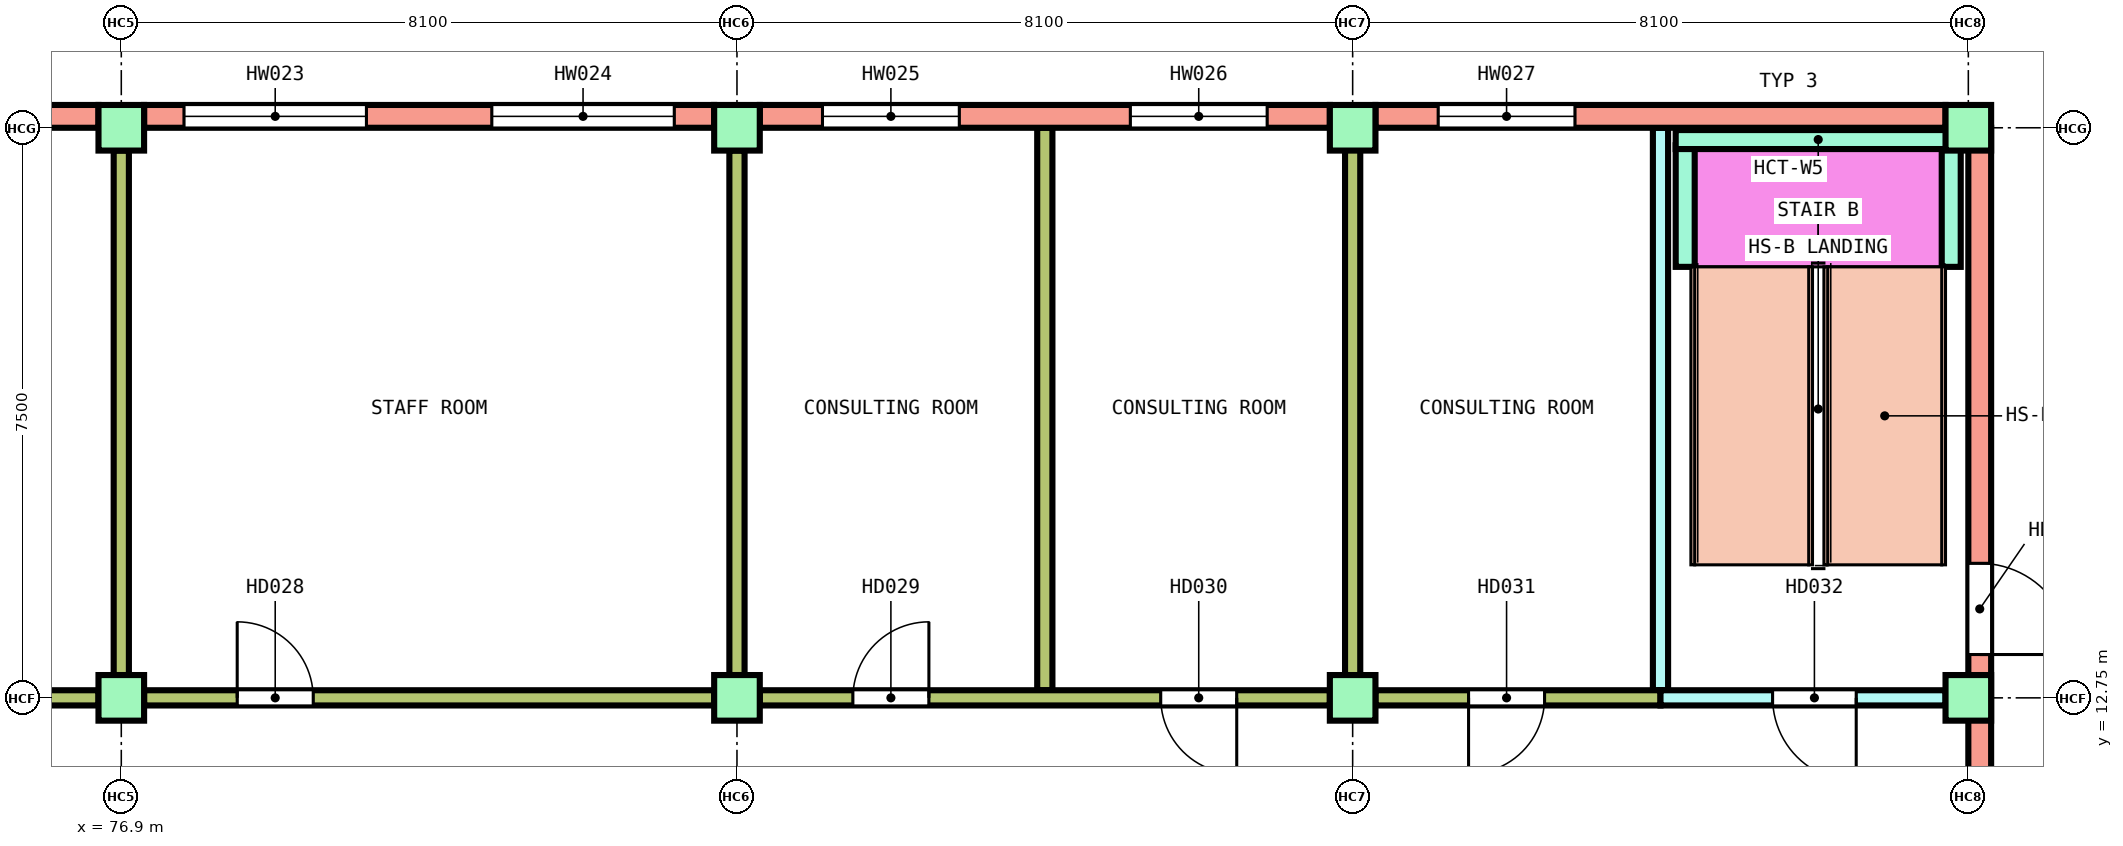
"""IFC4 building model, lengths in metres.
Left out: names, types, materials, properties, quantities, classifications, styles, units other than length and angle.
Written with IfcOpenShell. Run it as: python <this file> out.ifc"""

import sys

from ifc_helpers import new_model, si_unit, direction, frame, frame_2d, origin, origin_2d, place, context, subcontext, project, spatial, rectangle, extrude, element, fill, save


model = new_model("IFC4")
c1 = context("Model", 3, precision=1e-05, world=origin(), true_north=direction((0.0, 1.0)))
c2 = subcontext(c1, "Body", "Model", "MODEL_VIEW")
j1 = project(units=[si_unit("LENGTHUNIT", "METRE"), si_unit("PLANEANGLEUNIT", "RADIAN")], contexts=[c1])
p1 = place(None, origin())
s1 = spatial("IfcSite", under=j1, at=p1, CompositionType="ELEMENT")
p2 = place(p1, origin())
s2 = spatial("IfcBuilding", under=s1, at=p2, CompositionType="ELEMENT")
p3 = place(p2, origin())
s3 = spatial("IfcBuildingStorey", under=s2, at=p3, CompositionType="ELEMENT", Elevation=0.0)
for number, where, z_axis, x_axis in (
    (1, (76.9, 12.75, -0.25), (0.0, 0.0, 1.0), (1.0, 0.0, 0.0)),
    (2, (85.0, 12.75, -0.25), (0.0, 0.0, 1.0), (1.0, 0.0, 0.0)),
    (3, (93.1, 12.75, -0.25), (0.0, 0.0, 1.0), (1.0, 0.0, 0.0)),
    (4, (101.2, 12.75, -0.25), (0.0, 0.0, 1.0), (1.0, 0.0, 0.0)),
    (5, (76.9, 20.25, -0.25), (0.0, 0.0, 1.0), (1.0, 0.0, 0.0)),
    (6, (85.0, 20.25, -0.25), (0.0, 0.0, 1.0), (1.0, 0.0, 0.0)),
    (7, (93.1, 20.25, -0.25), (0.0, 0.0, 1.0), (1.0, 0.0, 0.0)),
    (8, (101.2, 20.25, -0.25), (0.0, 0.0, 1.0), (1.0, 0.0, 0.0)),
):
    element("IfcColumn", number, at=place(p3, frame(where, z_axis=z_axis, x_axis=x_axis)), inside=s3, PredefinedType="COLUMN", context=c2, shape_type="SweptSolid", body=[
        extrude(rectangle(XDim=0.6, YDim=0.6, at=origin_2d()), origin(), (0.0, 0.0, 1.0), 5.85),
    ])
for number, where, z_axis, x_axis in (
    (9, (97.475, 18.42, 0.0), (0.0, 0.0, 1.0), (0.0, 1.0, 0.0)),
    (10, (100.975, 18.42, 0.0), (0.0, 0.0, 1.0), (0.0, 1.0, 0.0)),
):
    element("IfcWall", number, at=place(p3, frame(where, z_axis=z_axis, x_axis=x_axis)), inside=s3, PredefinedType="SOLIDWALL", context=c2, shape_type="SweptSolid", body=[
        extrude(rectangle(XDim=1.6, YDim=0.25, at=frame_2d((0.8, 0.0))), origin(), (0.0, 0.0, 1.0), 2.65),
    ])
p4 = place(p3, frame((97.35, 20.095, 0.0), z_axis=(0.0, 0.0, 1.0), x_axis=(1.0, 0.0, 0.0)))
e11 = element("IfcWall", 11, at=p4, inside=s3, PredefinedType="SOLIDWALL", context=c2, shape_type="SweptSolid", body=[
    extrude(rectangle(XDim=3.75, YDim=0.25, at=frame_2d((1.875, 0.0))), origin(), (0.0, 0.0, 1.0), 2.65),
])
p5 = place(p3, frame((85.0, 13.05, 0.0), z_axis=(0.0, 0.0, 1.0), x_axis=(0.0, 1.0, 0.0)))
e12 = element("IfcWall", 12, at=p5, inside=s3, PredefinedType="PARTITIONING", context=c2, shape_type="SweptSolid", body=[
    extrude(rectangle(XDim=6.9, YDim=0.2, at=frame_2d((3.45, 0.0))), origin(), (0.0, 0.0, 1.0), 4.8),
])
p6 = place(p3, frame((89.05, 12.85, 0.0), z_axis=(0.0, 0.0, 1.0), x_axis=(0.0, 1.0, 0.0)))
e13 = element("IfcWall", 13, at=p6, inside=s3, PredefinedType="PARTITIONING", context=c2, shape_type="SweptSolid", body=[
    extrude(rectangle(XDim=7.4, YDim=0.2, at=frame_2d((3.7, 0.0))), origin(), (0.0, 0.0, 1.0), 4.8),
])
p7 = place(p3, frame((93.1, 12.75, 0.0), z_axis=(0.0, 0.0, 1.0), x_axis=(0.0, 1.0, 0.0)))
e14 = element("IfcWall", 14, at=p7, inside=s3, PredefinedType="PARTITIONING", context=c2, shape_type="SweptSolid", body=[
    extrude(rectangle(XDim=7.5, YDim=0.2, at=frame_2d((3.75, 0.0))), origin(), (0.0, 0.0, 1.0), 4.8),
])
p8 = place(p3, frame((97.15, 12.85, 0.0), z_axis=(0.0, 0.0, 1.0), x_axis=(0.0, 1.0, 0.0)))
e15 = element("IfcWall", 15, at=p8, inside=s3, PredefinedType="SOLIDWALL", context=c2, shape_type="SweptSolid", body=[
    extrude(rectangle(XDim=7.4, YDim=0.2, at=frame_2d((3.7, 0.0))), origin(), (0.0, 0.0, 1.0), 4.8),
])
p9 = place(p3, frame((101.35, 20.25, 0.0), z_axis=(0.0, 0.0, 1.0), x_axis=(0.0, -1.0, 0.0)))
e16 = element("IfcWall", 16, at=p9, inside=s3, PredefinedType="SOLIDWALL", context=c2, shape_type="SweptSolid", body=[
    extrude(rectangle(XDim=40.5, YDim=0.3, at=frame_2d((20.25, 0.0))), origin(), (0.0, 0.0, 1.0), 4.8),
])
p10 = place(p9, frame((5.73, 0.0, 0.0)))
e17 = element("IfcOpeningElement", 17, at=p10, cuts=e16, PredefinedType="OPENING", context=c2, shape_type="SweptSolid", body=[
    extrude(rectangle(XDim=1.2, YDim=2.1, at=frame_2d((0.6, 1.05))), frame((0.0, 0.16, 0.0), z_axis=(0.0, -1.0, 0.0), x_axis=(1.0, 0.0, 0.0)), (0.0, 0.0, 1.0), 0.32),
])
p11 = place(p9, frame((23.625, 0.0, 0.0)))
e18 = element("IfcOpeningElement", 18, at=p11, cuts=e16, PredefinedType="OPENING", context=c2, shape_type="SweptSolid", body=[
    extrude(rectangle(XDim=3.0, YDim=3.0, at=frame_2d((1.5, 1.5))), frame((0.0, 0.16, 0.0), z_axis=(0.0, -1.0, 0.0), x_axis=(1.0, 0.0, 0.0)), (0.0, 0.0, 1.0), 0.32),
])
p12 = place(p9, frame((36.15, 0.0, 1.5)))
e19 = element("IfcOpeningElement", 19, at=p12, cuts=e16, PredefinedType="OPENING", context=c2, shape_type="SweptSolid", body=[
    extrude(rectangle(XDim=1.2, YDim=0.9, at=frame_2d((0.6, 0.45))), frame((0.0, 0.16, 0.0), z_axis=(0.0, -1.0, 0.0), x_axis=(1.0, 0.0, 0.0)), (0.0, 0.0, 1.0), 0.32),
])
p13 = place(p9, frame((14.775, 0.0, 1.5)))
e20 = element("IfcOpeningElement", 20, at=p13, cuts=e16, PredefinedType="OPENING", context=c2, shape_type="SweptSolid", body=[
    extrude(rectangle(XDim=1.2, YDim=0.9, at=frame_2d((0.6, 0.45))), frame((0.0, 0.16, 0.0), z_axis=(0.0, -1.0, 0.0), x_axis=(1.0, 0.0, 0.0)), (0.0, 0.0, 1.0), 0.32),
])
p14 = place(p3, frame((76.9, 13.05, 0.0), z_axis=(0.0, 0.0, 1.0), x_axis=(0.0, 1.0, 0.0)))
e21 = element("IfcWall", 21, at=p14, inside=s3, PredefinedType="PARTITIONING", context=c2, shape_type="SweptSolid", body=[
    extrude(rectangle(XDim=6.9, YDim=0.2, at=frame_2d((3.45, 0.0))), origin(), (0.0, 0.0, 1.0), 4.8),
])
p15 = place(p3, frame((69.1, 12.75, 0.0), z_axis=(0.0, 0.0, 1.0), x_axis=(1.0, 0.0, 0.0)))
e22 = element("IfcWall", 22, at=p15, inside=s3, PredefinedType="PARTITIONING", context=c2, shape_type="SweptSolid", body=[
    extrude(rectangle(XDim=7.5, YDim=0.2, at=frame_2d((3.75, 0.0))), origin(), (0.0, 0.0, 1.0), 4.8),
])
p16 = place(p15, frame((1.125, 0.0, 0.0)))
e23 = element("IfcOpeningElement", 23, at=p16, cuts=e22, PredefinedType="OPENING", context=c2, shape_type="SweptSolid", body=[
    extrude(rectangle(XDim=1.2, YDim=2.1, at=frame_2d((0.6, 1.05))), frame((0.0, 0.11, 0.0), z_axis=(0.0, -1.0, 0.0), x_axis=(1.0, 0.0, 0.0)), (0.0, 0.0, 1.0), 0.22),
])
p17 = place(p3, frame((77.2, 12.75, 0.0), z_axis=(0.0, 0.0, 1.0), x_axis=(1.0, 0.0, 0.0)))
e24 = element("IfcWall", 24, at=p17, inside=s3, PredefinedType="PARTITIONING", context=c2, shape_type="SweptSolid", body=[
    extrude(rectangle(XDim=7.5, YDim=0.2, at=frame_2d((3.75, 0.0))), origin(), (0.0, 0.0, 1.0), 4.8),
])
p18 = place(p17, frame((1.225, 0.0, 0.0)))
e25 = element("IfcOpeningElement", 25, at=p18, cuts=e24, PredefinedType="OPENING", context=c2, shape_type="SweptSolid", body=[
    extrude(rectangle(XDim=1.0, YDim=2.1, at=frame_2d((0.5, 1.05))), frame((0.0, 0.11, 0.0), z_axis=(0.0, -1.0, 0.0), x_axis=(1.0, 0.0, 0.0)), (0.0, 0.0, 1.0), 0.22),
])
p19 = place(p3, frame((85.3, 12.75, 0.0), z_axis=(0.0, 0.0, 1.0), x_axis=(1.0, 0.0, 0.0)))
e26 = element("IfcWall", 26, at=p19, inside=s3, PredefinedType="PARTITIONING", context=c2, shape_type="SweptSolid", body=[
    extrude(rectangle(XDim=7.5, YDim=0.2, at=frame_2d((3.75, 0.0))), origin(), (0.0, 0.0, 1.0), 4.8),
])
p20 = place(p19, frame((1.225, 0.0, 0.0)))
e27 = element("IfcOpeningElement", 27, at=p20, cuts=e26, PredefinedType="OPENING", context=c2, shape_type="SweptSolid", body=[
    extrude(rectangle(XDim=1.0, YDim=2.1, at=frame_2d((0.5, 1.05))), frame((0.0, 0.11, 0.0), z_axis=(0.0, -1.0, 0.0), x_axis=(1.0, 0.0, 0.0)), (0.0, 0.0, 1.0), 0.22),
])
p21 = place(p19, frame((5.275, 0.0, 0.0)))
e28 = element("IfcOpeningElement", 28, at=p21, cuts=e26, PredefinedType="OPENING", context=c2, shape_type="SweptSolid", body=[
    extrude(rectangle(XDim=1.0, YDim=2.1, at=frame_2d((0.5, 1.05))), frame((0.0, 0.11, 0.0), z_axis=(0.0, -1.0, 0.0), x_axis=(1.0, 0.0, 0.0)), (0.0, 0.0, 1.0), 0.22),
])
p22 = place(p3, frame((93.4, 12.75, 0.0), z_axis=(0.0, 0.0, 1.0), x_axis=(1.0, 0.0, 0.0)))
e29 = element("IfcWall", 29, at=p22, inside=s3, PredefinedType="PARTITIONING", context=c2, shape_type="SweptSolid", body=[
    extrude(rectangle(XDim=3.75, YDim=0.2, at=frame_2d((1.875, 0.0))), origin(), (0.0, 0.0, 1.0), 4.8),
])
p23 = place(p22, frame((1.225, 0.0, 0.0)))
e30 = element("IfcOpeningElement", 30, at=p23, cuts=e29, PredefinedType="OPENING", context=c2, shape_type="SweptSolid", body=[
    extrude(rectangle(XDim=1.0, YDim=2.1, at=frame_2d((0.5, 1.05))), frame((0.0, 0.11, 0.0), z_axis=(0.0, -1.0, 0.0), x_axis=(1.0, 0.0, 0.0)), (0.0, 0.0, 1.0), 0.22),
])
p24 = place(p3, frame((97.15, 12.75, 0.0), z_axis=(0.0, 0.0, 1.0), x_axis=(1.0, 0.0, 0.0)))
e31 = element("IfcWall", 31, at=p24, inside=s3, PredefinedType="SOLIDWALL", context=c2, shape_type="SweptSolid", body=[
    extrude(rectangle(XDim=3.75, YDim=0.2, at=frame_2d((1.875, 0.0))), origin(), (0.0, 0.0, 1.0), 4.8),
])
p25 = place(p24, frame((1.475, 0.0, 0.0)))
e32 = element("IfcOpeningElement", 32, at=p25, cuts=e31, PredefinedType="OPENING", context=c2, shape_type="SweptSolid", body=[
    extrude(rectangle(XDim=1.1, YDim=2.1, at=frame_2d((0.55, 1.05))), frame((0.0, 0.11, 0.0), z_axis=(0.0, -1.0, 0.0), x_axis=(1.0, 0.0, 0.0)), (0.0, 0.0, 1.0), 0.22),
])
p26 = place(p3, frame((69.1, 20.4, 0.0), z_axis=(0.0, 0.0, 1.0), x_axis=(1.0, 0.0, 0.0)))
e33 = element("IfcWall", 33, at=p26, inside=s3, PredefinedType="SOLIDWALL", context=c2, shape_type="SweptSolid", body=[
    extrude(rectangle(XDim=7.5, YDim=0.3, at=frame_2d((3.75, 0.0))), origin(), (0.0, 0.0, 1.0), 4.8),
])
p27 = place(p26, frame((0.825, 0.0, 0.9)))
e34 = element("IfcOpeningElement", 34, at=p27, cuts=e33, PredefinedType="OPENING", context=c2, shape_type="SweptSolid", body=[
    extrude(rectangle(XDim=1.8, YDim=1.8, at=frame_2d((0.9, 0.9))), frame((0.0, 0.16, 0.0), z_axis=(0.0, -1.0, 0.0), x_axis=(1.0, 0.0, 0.0)), (0.0, 0.0, 1.0), 0.32),
])
p28 = place(p26, frame((4.875, 0.0, 0.9)))
e35 = element("IfcOpeningElement", 35, at=p28, cuts=e33, PredefinedType="OPENING", context=c2, shape_type="SweptSolid", body=[
    extrude(rectangle(XDim=1.8, YDim=1.8, at=frame_2d((0.9, 0.9))), frame((0.0, 0.16, 0.0), z_axis=(0.0, -1.0, 0.0), x_axis=(1.0, 0.0, 0.0)), (0.0, 0.0, 1.0), 0.32),
])
p29 = place(p3, frame((77.2, 20.4, 0.0), z_axis=(0.0, 0.0, 1.0), x_axis=(1.0, 0.0, 0.0)))
e36 = element("IfcWall", 36, at=p29, inside=s3, PredefinedType="SOLIDWALL", context=c2, shape_type="SweptSolid", body=[
    extrude(rectangle(XDim=7.5, YDim=0.3, at=frame_2d((3.75, 0.0))), origin(), (0.0, 0.0, 1.0), 4.8),
])
p30 = place(p29, frame((0.525, 0.0, 0.3)))
e37 = element("IfcOpeningElement", 37, at=p30, cuts=e36, PredefinedType="OPENING", context=c2, shape_type="SweptSolid", body=[
    extrude(rectangle(XDim=2.4, YDim=2.4, at=frame_2d((1.2, 1.2))), frame((0.0, 0.16, 0.0), z_axis=(0.0, -1.0, 0.0), x_axis=(1.0, 0.0, 0.0)), (0.0, 0.0, 1.0), 0.32),
])
p31 = place(p29, frame((4.575, 0.0, 0.3)))
e38 = element("IfcOpeningElement", 38, at=p31, cuts=e36, PredefinedType="OPENING", context=c2, shape_type="SweptSolid", body=[
    extrude(rectangle(XDim=2.4, YDim=2.4, at=frame_2d((1.2, 1.2))), frame((0.0, 0.16, 0.0), z_axis=(0.0, -1.0, 0.0), x_axis=(1.0, 0.0, 0.0)), (0.0, 0.0, 1.0), 0.32),
])
p32 = place(p3, frame((85.3, 20.4, 0.0), z_axis=(0.0, 0.0, 1.0), x_axis=(1.0, 0.0, 0.0)))
e39 = element("IfcWall", 39, at=p32, inside=s3, PredefinedType="SOLIDWALL", context=c2, shape_type="SweptSolid", body=[
    extrude(rectangle(XDim=7.5, YDim=0.3, at=frame_2d((3.75, 0.0))), origin(), (0.0, 0.0, 1.0), 4.8),
])
p33 = place(p32, frame((0.825, 0.0, 0.9)))
e40 = element("IfcOpeningElement", 40, at=p33, cuts=e39, PredefinedType="OPENING", context=c2, shape_type="SweptSolid", body=[
    extrude(rectangle(XDim=1.8, YDim=1.8, at=frame_2d((0.9, 0.9))), frame((0.0, 0.16, 0.0), z_axis=(0.0, -1.0, 0.0), x_axis=(1.0, 0.0, 0.0)), (0.0, 0.0, 1.0), 0.32),
])
p34 = place(p32, frame((4.875, 0.0, 0.9)))
e41 = element("IfcOpeningElement", 41, at=p34, cuts=e39, PredefinedType="OPENING", context=c2, shape_type="SweptSolid", body=[
    extrude(rectangle(XDim=1.8, YDim=1.8, at=frame_2d((0.9, 0.9))), frame((0.0, 0.16, 0.0), z_axis=(0.0, -1.0, 0.0), x_axis=(1.0, 0.0, 0.0)), (0.0, 0.0, 1.0), 0.32),
])
p35 = place(p3, frame((93.4, 20.4, 0.0), z_axis=(0.0, 0.0, 1.0), x_axis=(1.0, 0.0, 0.0)))
e42 = element("IfcWall", 42, at=p35, inside=s3, PredefinedType="SOLIDWALL", context=c2, shape_type="SweptSolid", body=[
    extrude(rectangle(XDim=7.5, YDim=0.3, at=frame_2d((3.75, 0.0))), origin(), (0.0, 0.0, 1.0), 4.8),
])
p36 = place(p35, frame((0.825, 0.0, 0.9)))
e43 = element("IfcOpeningElement", 43, at=p36, cuts=e42, PredefinedType="OPENING", context=c2, shape_type="SweptSolid", body=[
    extrude(rectangle(XDim=1.8, YDim=1.8, at=frame_2d((0.9, 0.9))), frame((0.0, 0.16, 0.0), z_axis=(0.0, -1.0, 0.0), x_axis=(1.0, 0.0, 0.0)), (0.0, 0.0, 1.0), 0.32),
])
p37 = place(p18, origin())
e44 = element("IfcDoor", 44, at=p37, inside=s3, OperationType="SINGLE_SWING_LEFT", PredefinedType="DOOR", context=c2, shape_type="SweptSolid", body=[
    extrude(rectangle(XDim=1.0, YDim=2.1, at=frame_2d((0.5, 1.05))), frame((0.0, 0.025, 0.0), z_axis=(0.0, -1.0, 0.0), x_axis=(1.0, 0.0, 0.0)), (0.0, 0.0, 1.0), 0.05),
])
fill(e25, e44)
p38 = place(p20, origin())
e45 = element("IfcDoor", 45, at=p38, inside=s3, OperationType="SINGLE_SWING_RIGHT", PredefinedType="DOOR", context=c2, shape_type="SweptSolid", body=[
    extrude(rectangle(XDim=1.0, YDim=2.1, at=frame_2d((0.5, 1.05))), frame((0.0, 0.025, 0.0), z_axis=(0.0, -1.0, 0.0), x_axis=(1.0, 0.0, 0.0)), (0.0, 0.0, 1.0), 0.05),
])
fill(e27, e45)
p39 = place(p21, origin())
e46 = element("IfcDoor", 46, at=p39, inside=s3, OperationType="SINGLE_SWING_LEFT", PredefinedType="DOOR", context=c2, shape_type="SweptSolid", body=[
    extrude(rectangle(XDim=1.0, YDim=2.1, at=frame_2d((0.5, 1.05))), frame((0.0, 0.025, 0.0), z_axis=(0.0, -1.0, 0.0), x_axis=(1.0, 0.0, 0.0)), (0.0, 0.0, 1.0), 0.05),
])
fill(e28, e46)
p40 = place(p23, origin())
e47 = element("IfcDoor", 47, at=p40, inside=s3, OperationType="SINGLE_SWING_RIGHT", PredefinedType="DOOR", context=c2, shape_type="SweptSolid", body=[
    extrude(rectangle(XDim=1.0, YDim=2.1, at=frame_2d((0.5, 1.05))), frame((0.0, 0.025, 0.0), z_axis=(0.0, -1.0, 0.0), x_axis=(1.0, 0.0, 0.0)), (0.0, 0.0, 1.0), 0.05),
])
fill(e30, e47)
p41 = place(p25, origin())
e48 = element("IfcDoor", 48, at=p41, inside=s3, OperationType="SINGLE_SWING_LEFT", PredefinedType="DOOR", context=c2, shape_type="SweptSolid", body=[
    extrude(rectangle(XDim=1.1, YDim=2.1, at=frame_2d((0.55, 1.05))), frame((0.0, 0.025, 0.0), z_axis=(0.0, -1.0, 0.0), x_axis=(1.0, 0.0, 0.0)), (0.0, 0.0, 1.0), 0.05),
])
fill(e32, e48)
p42 = place(p10, origin())
e49 = element("IfcDoor", 49, at=p42, inside=s3, OperationType="SINGLE_SWING_RIGHT", PredefinedType="DOOR", context=c2, shape_type="SweptSolid", body=[
    extrude(rectangle(XDim=1.2, YDim=2.1, at=frame_2d((0.6, 1.05))), frame((0.0, 0.025, 0.0), z_axis=(0.0, -1.0, 0.0), x_axis=(1.0, 0.0, 0.0)), (0.0, 0.0, 1.0), 0.05),
])
fill(e17, e49)
p43 = place(p30, origin())
e50 = element("IfcWindow", 50, at=p43, inside=s3, PartitioningType="DOUBLE_PANEL_VERTICAL", PredefinedType="WINDOW", context=c2, shape_type="SweptSolid", body=[
    extrude(rectangle(XDim=2.4, YDim=2.4, at=frame_2d((1.2, 1.2))), frame((0.0, 0.03, 0.0), z_axis=(0.0, -1.0, 0.0), x_axis=(1.0, 0.0, 0.0)), (0.0, 0.0, 1.0), 0.06),
])
fill(e37, e50)
p44 = place(p31, origin())
e51 = element("IfcWindow", 51, at=p44, inside=s3, PartitioningType="DOUBLE_PANEL_VERTICAL", PredefinedType="WINDOW", context=c2, shape_type="SweptSolid", body=[
    extrude(rectangle(XDim=2.4, YDim=2.4, at=frame_2d((1.2, 1.2))), frame((0.0, 0.03, 0.0), z_axis=(0.0, -1.0, 0.0), x_axis=(1.0, 0.0, 0.0)), (0.0, 0.0, 1.0), 0.06),
])
fill(e38, e51)
p45 = place(p33, origin())
e52 = element("IfcWindow", 52, at=p45, inside=s3, PartitioningType="SINGLE_PANEL", PredefinedType="WINDOW", context=c2, shape_type="SweptSolid", body=[
    extrude(rectangle(XDim=1.8, YDim=1.8, at=frame_2d((0.9, 0.9))), frame((0.0, 0.03, 0.0), z_axis=(0.0, -1.0, 0.0), x_axis=(1.0, 0.0, 0.0)), (0.0, 0.0, 1.0), 0.06),
])
fill(e40, e52)
p46 = place(p34, origin())
e53 = element("IfcWindow", 53, at=p46, inside=s3, PartitioningType="SINGLE_PANEL", PredefinedType="WINDOW", context=c2, shape_type="SweptSolid", body=[
    extrude(rectangle(XDim=1.8, YDim=1.8, at=frame_2d((0.9, 0.9))), frame((0.0, 0.03, 0.0), z_axis=(0.0, -1.0, 0.0), x_axis=(1.0, 0.0, 0.0)), (0.0, 0.0, 1.0), 0.06),
])
fill(e41, e53)
p47 = place(p36, origin())
e54 = element("IfcWindow", 54, at=p47, inside=s3, PartitioningType="SINGLE_PANEL", PredefinedType="WINDOW", context=c2, shape_type="SweptSolid", body=[
    extrude(rectangle(XDim=1.8, YDim=1.8, at=frame_2d((0.9, 0.9))), frame((0.0, 0.03, 0.0), z_axis=(0.0, -1.0, 0.0), x_axis=(1.0, 0.0, 0.0)), (0.0, 0.0, 1.0), 0.06),
])
fill(e43, e54)
save(model, sys.argv[1])
